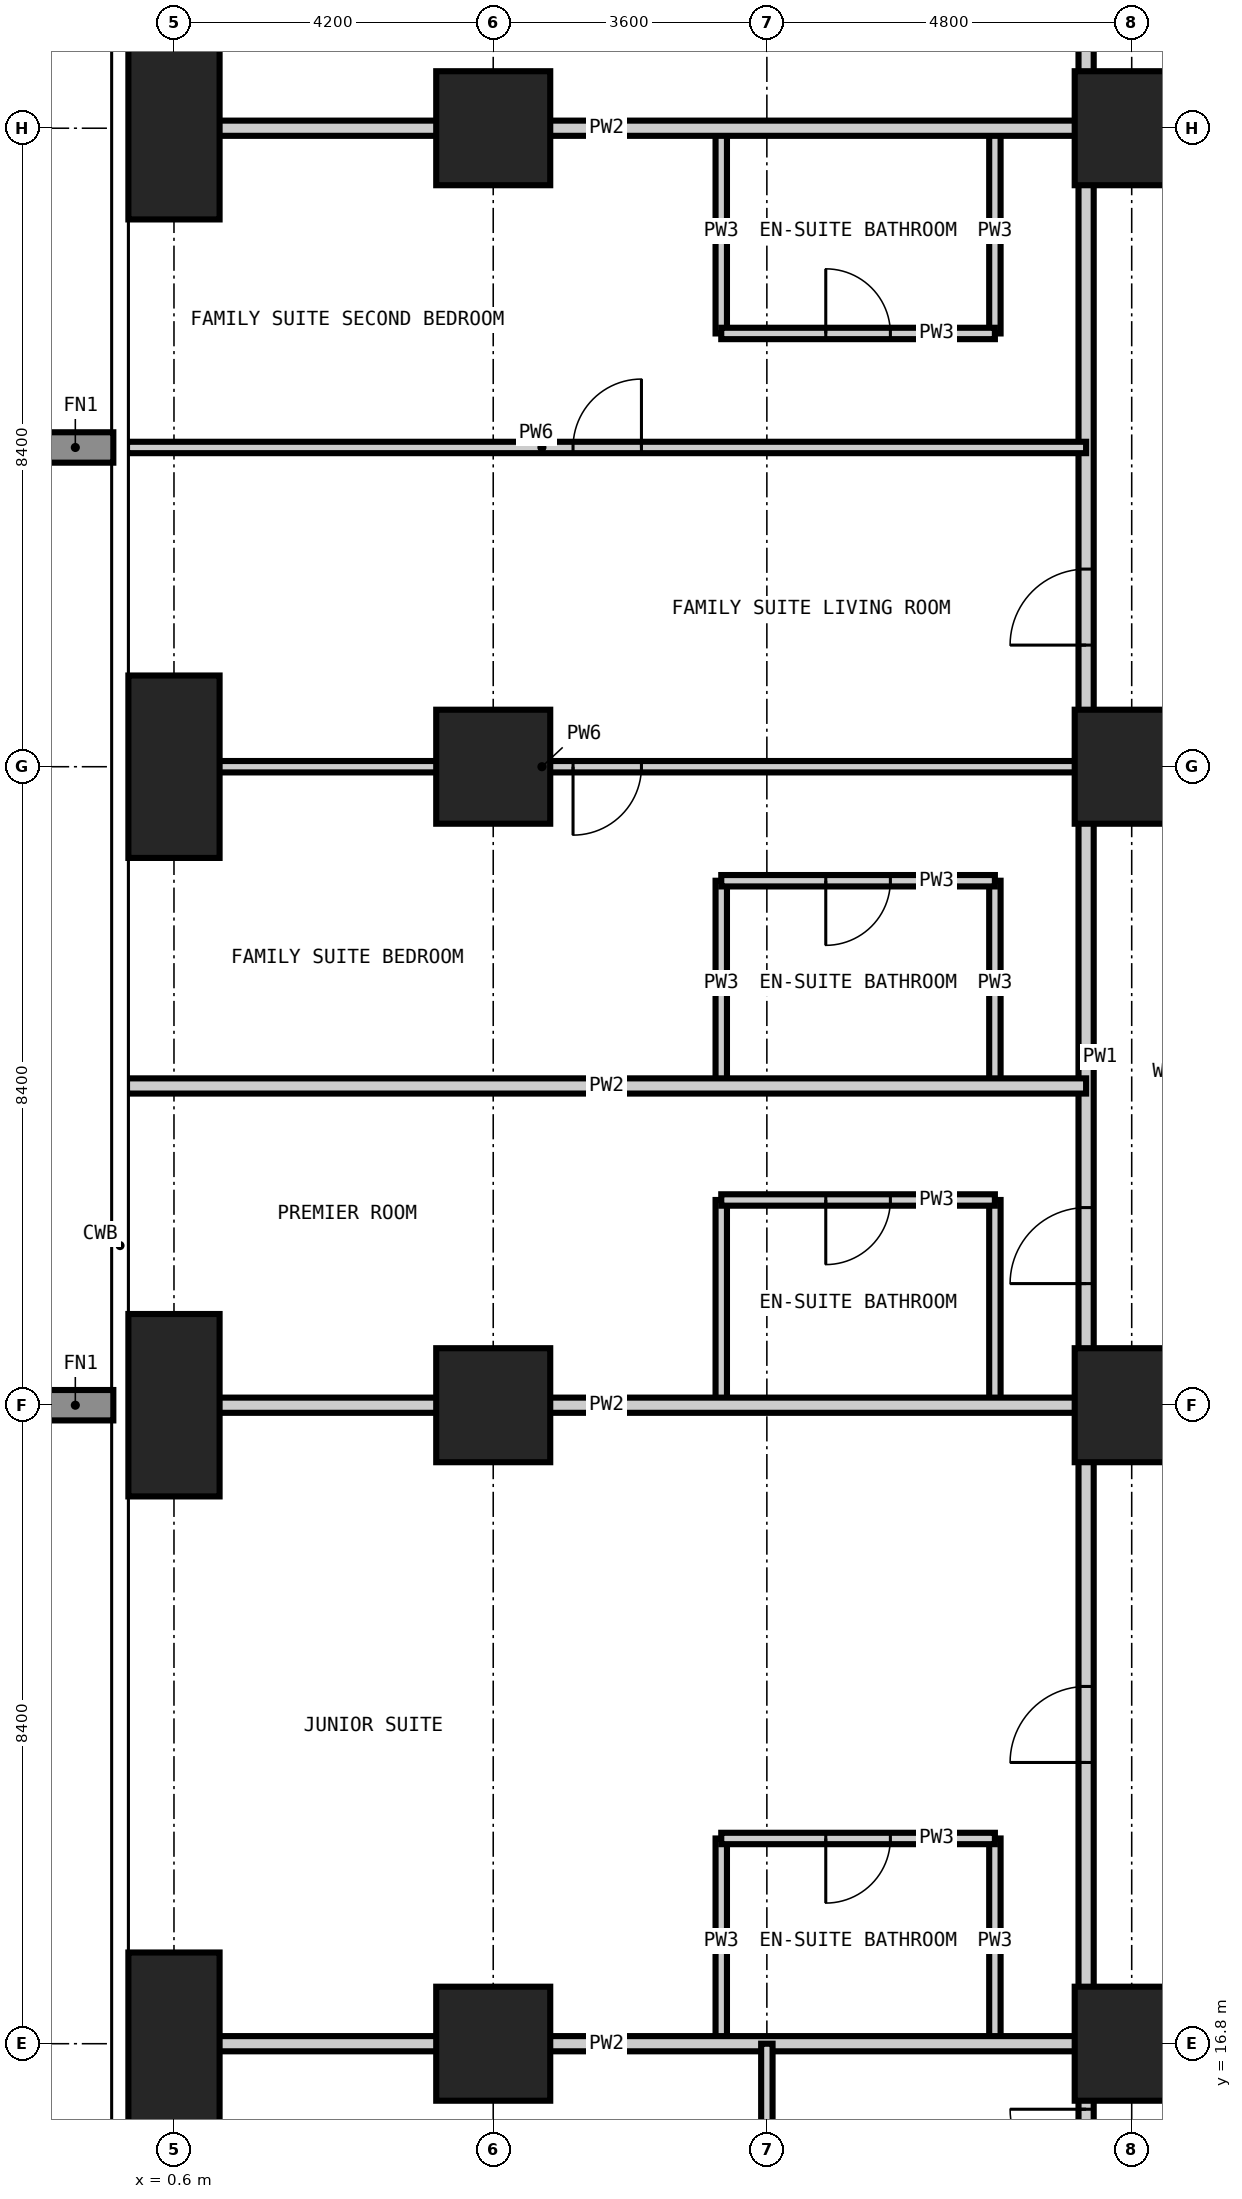
"""IFC4 building model, lengths in metres.
Left out: names, types, materials, properties, quantities, classifications, styles, units other than length and angle.
Written with IfcOpenShell. Run it as: python <this file> out.ifc"""

import sys

from ifc_helpers import new_model, si_unit, direction, frame, frame_2d, origin, origin_2d, place, context, subcontext, project, spatial, rectangle, extrude, element, fill, save


model = new_model("IFC4")
c1 = context("Model", 3, precision=1e-05, world=origin(), true_north=direction((0.0, 1.0)))
c2 = subcontext(c1, "Body", "Model", "MODEL_VIEW")
j1 = project(units=[si_unit("LENGTHUNIT", "METRE"), si_unit("PLANEANGLEUNIT", "RADIAN")], contexts=[c1])
p1 = place(None, origin())
s1 = spatial("IfcSite", under=j1, at=p1, CompositionType="ELEMENT")
p2 = place(p1, origin())
s2 = spatial("IfcBuilding", under=s1, at=p2, CompositionType="ELEMENT")
p3 = place(p2, frame((0.0, 0.0, 133.2)))
s3 = spatial("IfcBuildingStorey", under=s2, at=p3, CompositionType="ELEMENT", Elevation=133.2)
for number, where, z_axis, x_axis in (
    (1, (0.6, 16.8, -0.35), (0.0, 0.0, 1.0), (1.0, 0.0, 0.0)),
    (2, (0.6, 25.2, -0.35), (0.0, 0.0, 1.0), (1.0, 0.0, 0.0)),
    (3, (0.6, 33.6, -0.35), (0.0, 0.0, 1.0), (1.0, 0.0, 0.0)),
    (4, (0.6, 42.0, -0.35), (0.0, 0.0, 1.0), (1.0, 0.0, 0.0)),
):
    element("IfcColumn", number, at=place(p3, frame(where, z_axis=z_axis, x_axis=x_axis)), inside=s3, PredefinedType="COLUMN", context=c2, shape_type="SweptSolid", body=[
        extrude(rectangle(XDim=1.2, YDim=2.4, at=origin_2d()), origin(), (0.0, 0.0, 1.0), 3.6),
    ])
for number, where, z_axis, x_axis in (
    (5, (4.8, 16.8, -0.35), (0.0, 0.0, 1.0), (1.0, 0.0, 0.0)),
    (6, (4.8, 25.2, -0.35), (0.0, 0.0, 1.0), (1.0, 0.0, 0.0)),
    (7, (4.8, 33.6, -0.35), (0.0, 0.0, 1.0), (1.0, 0.0, 0.0)),
    (8, (4.8, 42.0, -0.35), (0.0, 0.0, 1.0), (1.0, 0.0, 0.0)),
    (9, (13.2, 16.8, -0.35), (0.0, 0.0, 1.0), (1.0, 0.0, 0.0)),
    (10, (13.2, 25.2, -0.35), (0.0, 0.0, 1.0), (1.0, 0.0, 0.0)),
    (11, (13.2, 33.6, -0.35), (0.0, 0.0, 1.0), (1.0, 0.0, 0.0)),
    (12, (13.2, 42.0, -0.35), (0.0, 0.0, 1.0), (1.0, 0.0, 0.0)),
):
    element("IfcColumn", number, at=place(p3, frame(where, z_axis=z_axis, x_axis=x_axis)), inside=s3, PredefinedType="COLUMN", context=c2, shape_type="SweptSolid", body=[
        extrude(rectangle(XDim=1.5, YDim=1.5, at=origin_2d()), origin(), (0.0, 0.0, 1.0), 3.6),
    ])
for number, where, z_axis, x_axis in (
    (13, (7.8, 16.8, 0.0), (0.0, 0.0, 1.0), (0.0, 1.0, 0.0)),
    (14, (7.8, 25.2, 0.0), (0.0, 0.0, 1.0), (0.0, 1.0, 0.0)),
):
    element("IfcWall", number, at=place(p3, frame(where, z_axis=z_axis, x_axis=x_axis)), inside=s3, PredefinedType="PARTITIONING", context=c2, shape_type="SweptSolid", body=[
        extrude(rectangle(XDim=2.7, YDim=0.15, at=frame_2d((1.35, 0.0))), origin(), (0.0, 0.0, 1.0), 3.25),
    ])
p4 = place(p3, frame((7.8, 29.4, 0.0), z_axis=(0.0, 0.0, 1.0), x_axis=(0.0, 1.0, 0.0)))
e15 = element("IfcWall", 15, at=p4, inside=s3, PredefinedType="PARTITIONING", context=c2, shape_type="SweptSolid", body=[
    extrude(rectangle(XDim=2.7, YDim=0.15, at=frame_2d((1.35, 0.0))), origin(), (0.0, 0.0, 1.0), 3.25),
])
for number, where, z_axis, x_axis in (
    (16, (7.8, 39.3, 0.0), (0.0, 0.0, 1.0), (0.0, 1.0, 0.0)),
    (17, (11.4, 16.8, 0.0), (0.0, 0.0, 1.0), (0.0, 1.0, 0.0)),
    (18, (11.4, 25.2, 0.0), (0.0, 0.0, 1.0), (0.0, 1.0, 0.0)),
):
    element("IfcWall", number, at=place(p3, frame(where, z_axis=z_axis, x_axis=x_axis)), inside=s3, PredefinedType="PARTITIONING", context=c2, shape_type="SweptSolid", body=[
        extrude(rectangle(XDim=2.7, YDim=0.15, at=frame_2d((1.35, 0.0))), origin(), (0.0, 0.0, 1.0), 3.25),
    ])
p5 = place(p3, frame((11.4, 29.4, 0.0), z_axis=(0.0, 0.0, 1.0), x_axis=(0.0, 1.0, 0.0)))
e19 = element("IfcWall", 19, at=p5, inside=s3, PredefinedType="PARTITIONING", context=c2, shape_type="SweptSolid", body=[
    extrude(rectangle(XDim=2.7, YDim=0.15, at=frame_2d((1.35, 0.0))), origin(), (0.0, 0.0, 1.0), 3.25),
])
p6 = place(p3, frame((11.4, 39.3, 0.0), z_axis=(0.0, 0.0, 1.0), x_axis=(0.0, 1.0, 0.0)))
e20 = element("IfcWall", 20, at=p6, inside=s3, PredefinedType="PARTITIONING", context=c2, shape_type="SweptSolid", body=[
    extrude(rectangle(XDim=2.7, YDim=0.15, at=frame_2d((1.35, 0.0))), origin(), (0.0, 0.0, 1.0), 3.25),
])
p7 = place(p3, frame((7.8, 19.5, 0.0), z_axis=(0.0, 0.0, 1.0), x_axis=(1.0, 0.0, 0.0)))
e21 = element("IfcWall", 21, at=p7, inside=s3, PredefinedType="PARTITIONING", context=c2, shape_type="SweptSolid", body=[
    extrude(rectangle(XDim=3.6, YDim=0.15, at=frame_2d((1.8, 0.0))), origin(), (0.0, 0.0, 1.0), 3.25),
])
p8 = place(p7, frame((1.375, 0.0, 0.0)))
e22 = element("IfcOpeningElement", 22, at=p8, cuts=e21, PredefinedType="OPENING", context=c2, shape_type="SweptSolid", body=[
    extrude(rectangle(XDim=0.85, YDim=2.1, at=frame_2d((0.425, 1.05))), frame((0.0, 0.085, 0.0), z_axis=(0.0, -1.0, 0.0), x_axis=(1.0, 0.0, 0.0)), (0.0, 0.0, 1.0), 0.17),
])
p9 = place(p3, frame((7.8, 27.9, 0.0), z_axis=(0.0, 0.0, 1.0), x_axis=(1.0, 0.0, 0.0)))
e23 = element("IfcWall", 23, at=p9, inside=s3, PredefinedType="PARTITIONING", context=c2, shape_type="SweptSolid", body=[
    extrude(rectangle(XDim=3.6, YDim=0.15, at=frame_2d((1.8, 0.0))), origin(), (0.0, 0.0, 1.0), 3.25),
])
p10 = place(p9, frame((1.375, 0.0, 0.0)))
e24 = element("IfcOpeningElement", 24, at=p10, cuts=e23, PredefinedType="OPENING", context=c2, shape_type="SweptSolid", body=[
    extrude(rectangle(XDim=0.85, YDim=2.1, at=frame_2d((0.425, 1.05))), frame((0.0, 0.085, 0.0), z_axis=(0.0, -1.0, 0.0), x_axis=(1.0, 0.0, 0.0)), (0.0, 0.0, 1.0), 0.17),
])
p11 = place(p3, frame((7.8, 32.1, 0.0), z_axis=(0.0, 0.0, 1.0), x_axis=(1.0, 0.0, 0.0)))
e25 = element("IfcWall", 25, at=p11, inside=s3, PredefinedType="PARTITIONING", context=c2, shape_type="SweptSolid", body=[
    extrude(rectangle(XDim=3.6, YDim=0.15, at=frame_2d((1.8, 0.0))), origin(), (0.0, 0.0, 1.0), 3.25),
])
p12 = place(p11, frame((1.375, 0.0, 0.0)))
e26 = element("IfcOpeningElement", 26, at=p12, cuts=e25, PredefinedType="OPENING", context=c2, shape_type="SweptSolid", body=[
    extrude(rectangle(XDim=0.85, YDim=2.1, at=frame_2d((0.425, 1.05))), frame((0.0, 0.085, 0.0), z_axis=(0.0, -1.0, 0.0), x_axis=(1.0, 0.0, 0.0)), (0.0, 0.0, 1.0), 0.17),
])
p13 = place(p3, frame((7.8, 39.3, 0.0), z_axis=(0.0, 0.0, 1.0), x_axis=(1.0, 0.0, 0.0)))
e27 = element("IfcWall", 27, at=p13, inside=s3, PredefinedType="PARTITIONING", context=c2, shape_type="SweptSolid", body=[
    extrude(rectangle(XDim=3.6, YDim=0.15, at=frame_2d((1.8, 0.0))), origin(), (0.0, 0.0, 1.0), 3.25),
])
p14 = place(p13, frame((1.375, 0.0, 0.0)))
e28 = element("IfcOpeningElement", 28, at=p14, cuts=e27, PredefinedType="OPENING", context=c2, shape_type="SweptSolid", body=[
    extrude(rectangle(XDim=0.85, YDim=2.1, at=frame_2d((0.425, 1.05))), frame((0.0, 0.085, 0.0), z_axis=(0.0, -1.0, 0.0), x_axis=(1.0, 0.0, 0.0)), (0.0, 0.0, 1.0), 0.17),
])
p15 = place(p3, frame((12.6, 14.275, 0.0), z_axis=(0.0, 0.0, 1.0), x_axis=(0.0, 1.0, 0.0)))
e29 = element("IfcWall", 29, at=p15, inside=s3, PredefinedType="PARTITIONING", context=c2, shape_type="SweptSolid", body=[
    extrude(rectangle(XDim=30.85, YDim=0.2, at=frame_2d((15.425, 0.0))), origin(), (0.0, 0.0, 1.0), 3.25),
])
p16 = place(p15, frame((6.225, 0.0, 0.0)))
e30 = element("IfcOpeningElement", 30, at=p16, cuts=e29, PredefinedType="OPENING", context=c2, shape_type="SweptSolid", body=[
    extrude(rectangle(XDim=1.0, YDim=2.2, at=frame_2d((0.5, 1.1))), frame((0.0, 0.11, 0.0), z_axis=(0.0, -1.0, 0.0), x_axis=(1.0, 0.0, 0.0)), (0.0, 0.0, 1.0), 0.22),
])
p17 = place(p15, frame((12.525, 0.0, 0.0)))
e31 = element("IfcOpeningElement", 31, at=p17, cuts=e29, PredefinedType="OPENING", context=c2, shape_type="SweptSolid", body=[
    extrude(rectangle(XDim=1.0, YDim=2.2, at=frame_2d((0.5, 1.1))), frame((0.0, 0.11, 0.0), z_axis=(0.0, -1.0, 0.0), x_axis=(1.0, 0.0, 0.0)), (0.0, 0.0, 1.0), 0.22),
])
p18 = place(p15, frame((20.925, 0.0, 0.0)))
e32 = element("IfcOpeningElement", 32, at=p18, cuts=e29, PredefinedType="OPENING", context=c2, shape_type="SweptSolid", body=[
    extrude(rectangle(XDim=1.0, YDim=2.2, at=frame_2d((0.5, 1.1))), frame((0.0, 0.11, 0.0), z_axis=(0.0, -1.0, 0.0), x_axis=(1.0, 0.0, 0.0)), (0.0, 0.0, 1.0), 0.22),
])
p19 = place(p15, frame((0.663, 0.0, 0.0)))
e33 = element("IfcOpeningElement", 33, at=p19, cuts=e29, PredefinedType="OPENING", context=c2, shape_type="SweptSolid", body=[
    extrude(rectangle(XDim=1.0, YDim=2.2, at=frame_2d((0.5, 1.1))), frame((0.0, 0.11, 0.0), z_axis=(0.0, -1.0, 0.0), x_axis=(1.0, 0.0, 0.0)), (0.0, 0.0, 1.0), 0.22),
])
p20 = place(p15, frame((28.787, 0.0, 0.0)))
e34 = element("IfcOpeningElement", 34, at=p20, cuts=e29, PredefinedType="OPENING", context=c2, shape_type="SweptSolid", body=[
    extrude(rectangle(XDim=1.0, YDim=2.2, at=frame_2d((0.5, 1.1))), frame((0.0, 0.11, 0.0), z_axis=(0.0, -1.0, 0.0), x_axis=(1.0, 0.0, 0.0)), (0.0, 0.0, 1.0), 0.22),
])
for number, where, z_axis, x_axis in (
    (35, (-0.018, 16.8, 0.0), (0.0, 0.0, 1.0), (1.0, 0.0, 0.0)),
    (36, (-0.018, 25.2, 0.0), (0.0, 0.0, 1.0), (1.0, 0.0, 0.0)),
    (37, (-0.018, 29.4, 0.0), (0.0, 0.0, 1.0), (1.0, 0.0, 0.0)),
    (38, (-0.018, 42.0, 0.0), (0.0, 0.0, 1.0), (1.0, 0.0, 0.0)),
):
    element("IfcWall", number, at=place(p3, frame(where, z_axis=z_axis, x_axis=x_axis)), inside=s3, PredefinedType="PARTITIONING", context=c2, shape_type="SweptSolid", body=[
        extrude(rectangle(XDim=12.618, YDim=0.2, at=frame_2d((6.309, 0.0))), origin(), (0.0, 0.0, 1.0), 3.25),
    ])
p21 = place(p3, frame((8.4, -0.018, 0.0), z_axis=(0.0, 0.0, 1.0), x_axis=(0.0, 1.0, 0.0)))
e39 = element("IfcWall", 39, at=p21, inside=s3, PredefinedType="PARTITIONING", context=c2, shape_type="SweptSolid", body=[
    extrude(rectangle(XDim=16.818, YDim=0.15, at=frame_2d((8.409, 0.0))), origin(), (0.0, 0.0, 1.0), 3.25),
])
p22 = place(p21, frame((1.968, 0.0, 0.0)))
e40 = element("IfcOpeningElement", 40, at=p22, cuts=e39, PredefinedType="OPENING", context=c2, shape_type="SweptSolid", body=[
    extrude(rectangle(XDim=0.9, YDim=2.1, at=frame_2d((0.45, 1.05))), frame((0.0, 0.085, 0.0), z_axis=(0.0, -1.0, 0.0), x_axis=(1.0, 0.0, 0.0)), (0.0, 0.0, 1.0), 0.17),
])
p23 = place(p21, frame((12.168, 0.0, 0.0)))
e41 = element("IfcOpeningElement", 41, at=p23, cuts=e39, PredefinedType="OPENING", context=c2, shape_type="SweptSolid", body=[
    extrude(rectangle(XDim=0.9, YDim=2.1, at=frame_2d((0.45, 1.05))), frame((0.0, 0.085, 0.0), z_axis=(0.0, -1.0, 0.0), x_axis=(1.0, 0.0, 0.0)), (0.0, 0.0, 1.0), 0.17),
])
p24 = place(p3, frame((-0.018, 33.6, 0.0), z_axis=(0.0, 0.0, 1.0), x_axis=(1.0, 0.0, 0.0)))
e42 = element("IfcWall", 42, at=p24, inside=s3, PredefinedType="PARTITIONING", context=c2, shape_type="SweptSolid", body=[
    extrude(rectangle(XDim=12.618, YDim=0.15, at=frame_2d((6.309, 0.0))), origin(), (0.0, 0.0, 1.0), 3.25),
])
p25 = place(p24, frame((5.868, 0.0, 0.0)))
e43 = element("IfcOpeningElement", 43, at=p25, cuts=e42, PredefinedType="OPENING", context=c2, shape_type="SweptSolid", body=[
    extrude(rectangle(XDim=0.9, YDim=2.1, at=frame_2d((0.45, 1.05))), frame((0.0, 0.085, 0.0), z_axis=(0.0, -1.0, 0.0), x_axis=(1.0, 0.0, 0.0)), (0.0, 0.0, 1.0), 0.17),
])
p26 = place(p3, frame((-0.018, 37.8, 0.0), z_axis=(0.0, 0.0, 1.0), x_axis=(1.0, 0.0, 0.0)))
e44 = element("IfcWall", 44, at=p26, inside=s3, PredefinedType="PARTITIONING", context=c2, shape_type="SweptSolid", body=[
    extrude(rectangle(XDim=12.618, YDim=0.15, at=frame_2d((6.309, 0.0))), origin(), (0.0, 0.0, 1.0), 3.25),
])
p27 = place(p26, frame((5.868, 0.0, 0.0)))
e45 = element("IfcOpeningElement", 45, at=p27, cuts=e44, PredefinedType="OPENING", context=c2, shape_type="SweptSolid", body=[
    extrude(rectangle(XDim=0.9, YDim=2.1, at=frame_2d((0.45, 1.05))), frame((0.0, 0.085, 0.0), z_axis=(0.0, -1.0, 0.0), x_axis=(1.0, 0.0, 0.0)), (0.0, 0.0, 1.0), 0.17),
])
p28 = place(p16, origin())
e46 = element("IfcDoor", 46, at=p28, inside=s3, OperationType="SINGLE_SWING_LEFT", PredefinedType="DOOR", context=c2, shape_type="SweptSolid", body=[
    extrude(rectangle(XDim=1.0, YDim=2.2, at=frame_2d((0.5, 1.1))), frame((0.0, 0.025, 0.0), z_axis=(0.0, -1.0, 0.0), x_axis=(1.0, 0.0, 0.0)), (0.0, 0.0, 1.0), 0.05),
])
fill(e30, e46)
p29 = place(p8, frame((0.85, 0.0, 0.0), z_axis=(0.0, 0.0, 1.0), x_axis=(-1.0, 0.0, 0.0)))
e47 = element("IfcDoor", 47, at=p29, inside=s3, OperationType="SINGLE_SWING_RIGHT", PredefinedType="DOOR", context=c2, shape_type="SweptSolid", body=[
    extrude(rectangle(XDim=0.85, YDim=2.1, at=frame_2d((0.425, 1.05))), frame((0.0, 0.025, 0.0), z_axis=(0.0, -1.0, 0.0), x_axis=(1.0, 0.0, 0.0)), (0.0, 0.0, 1.0), 0.05),
])
fill(e22, e47)
p30 = place(p17, origin())
e48 = element("IfcDoor", 48, at=p30, inside=s3, OperationType="SINGLE_SWING_LEFT", PredefinedType="DOOR", context=c2, shape_type="SweptSolid", body=[
    extrude(rectangle(XDim=1.0, YDim=2.2, at=frame_2d((0.5, 1.1))), frame((0.0, 0.025, 0.0), z_axis=(0.0, -1.0, 0.0), x_axis=(1.0, 0.0, 0.0)), (0.0, 0.0, 1.0), 0.05),
])
fill(e31, e48)
p31 = place(p10, frame((0.85, 0.0, 0.0), z_axis=(0.0, 0.0, 1.0), x_axis=(-1.0, 0.0, 0.0)))
e49 = element("IfcDoor", 49, at=p31, inside=s3, OperationType="SINGLE_SWING_RIGHT", PredefinedType="DOOR", context=c2, shape_type="SweptSolid", body=[
    extrude(rectangle(XDim=0.85, YDim=2.1, at=frame_2d((0.425, 1.05))), frame((0.0, 0.025, 0.0), z_axis=(0.0, -1.0, 0.0), x_axis=(1.0, 0.0, 0.0)), (0.0, 0.0, 1.0), 0.05),
])
fill(e24, e49)
p32 = place(p18, origin())
e50 = element("IfcDoor", 50, at=p32, inside=s3, OperationType="SINGLE_SWING_LEFT", PredefinedType="DOOR", context=c2, shape_type="SweptSolid", body=[
    extrude(rectangle(XDim=1.0, YDim=2.2, at=frame_2d((0.5, 1.1))), frame((0.0, 0.025, 0.0), z_axis=(0.0, -1.0, 0.0), x_axis=(1.0, 0.0, 0.0)), (0.0, 0.0, 1.0), 0.05),
])
fill(e32, e50)
p33 = place(p25, frame((0.9, 0.0, 0.0), z_axis=(0.0, 0.0, 1.0), x_axis=(-1.0, 0.0, 0.0)))
e51 = element("IfcDoor", 51, at=p33, inside=s3, OperationType="SINGLE_SWING_RIGHT", PredefinedType="DOOR", context=c2, shape_type="SweptSolid", body=[
    extrude(rectangle(XDim=0.9, YDim=2.1, at=frame_2d((0.45, 1.05))), frame((0.0, 0.025, 0.0), z_axis=(0.0, -1.0, 0.0), x_axis=(1.0, 0.0, 0.0)), (0.0, 0.0, 1.0), 0.05),
])
fill(e43, e51)
p34 = place(p12, frame((0.85, 0.0, 0.0), z_axis=(0.0, 0.0, 1.0), x_axis=(-1.0, 0.0, 0.0)))
e52 = element("IfcDoor", 52, at=p34, inside=s3, OperationType="SINGLE_SWING_RIGHT", PredefinedType="DOOR", context=c2, shape_type="SweptSolid", body=[
    extrude(rectangle(XDim=0.85, YDim=2.1, at=frame_2d((0.425, 1.05))), frame((0.0, 0.025, 0.0), z_axis=(0.0, -1.0, 0.0), x_axis=(1.0, 0.0, 0.0)), (0.0, 0.0, 1.0), 0.05),
])
fill(e26, e52)
p35 = place(p27, origin())
e53 = element("IfcDoor", 53, at=p35, inside=s3, OperationType="SINGLE_SWING_RIGHT", PredefinedType="DOOR", context=c2, shape_type="SweptSolid", body=[
    extrude(rectangle(XDim=0.9, YDim=2.1, at=frame_2d((0.45, 1.05))), frame((0.0, 0.025, 0.0), z_axis=(0.0, -1.0, 0.0), x_axis=(1.0, 0.0, 0.0)), (0.0, 0.0, 1.0), 0.05),
])
fill(e45, e53)
p36 = place(p14, origin())
e54 = element("IfcDoor", 54, at=p36, inside=s3, OperationType="SINGLE_SWING_LEFT", PredefinedType="DOOR", context=c2, shape_type="SweptSolid", body=[
    extrude(rectangle(XDim=0.85, YDim=2.1, at=frame_2d((0.425, 1.05))), frame((0.0, 0.025, 0.0), z_axis=(0.0, -1.0, 0.0), x_axis=(1.0, 0.0, 0.0)), (0.0, 0.0, 1.0), 0.05),
])
fill(e28, e54)
p37 = place(p19, origin())
e55 = element("IfcDoor", 55, at=p37, inside=s3, OperationType="SINGLE_SWING_RIGHT", PredefinedType="DOOR", context=c2, shape_type="SweptSolid", body=[
    extrude(rectangle(XDim=1.0, YDim=2.2, at=frame_2d((0.5, 1.1))), frame((0.0, 0.025, 0.0), z_axis=(0.0, -1.0, 0.0), x_axis=(1.0, 0.0, 0.0)), (0.0, 0.0, 1.0), 0.05),
])
fill(e33, e55)
save(model, sys.argv[1])
